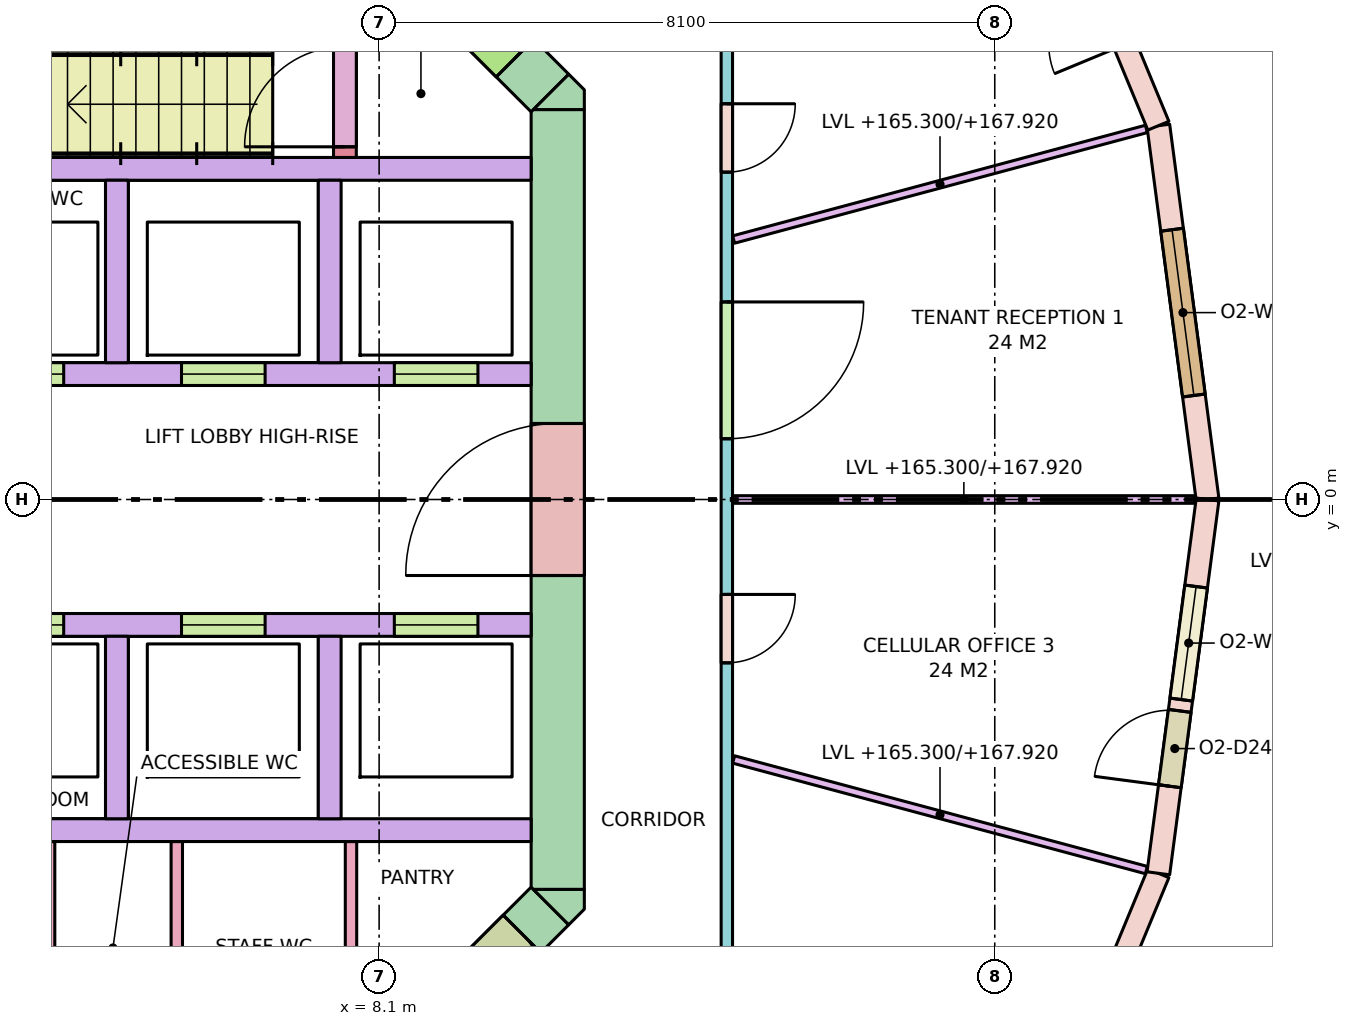
"""IFC4 building model, lengths in metres.
Left out: names, types, materials, properties, quantities, classifications, styles, units other than length and angle.
Written with IfcOpenShell. Run it as: python <this file> out.ifc"""

import sys

from ifc_helpers import new_model, si_unit, direction, frame, frame_2d, origin, place, context, subcontext, project, spatial, polyline, rectangle, outline, extrude, element, fill, save


model = new_model("IFC4")
c1 = context("Model", 3, precision=1e-05, world=origin(), true_north=direction((0.0, 1.0)))
c2 = subcontext(c1, "Body", "Model", "MODEL_VIEW")
j1 = project(units=[si_unit("LENGTHUNIT", "METRE"), si_unit("PLANEANGLEUNIT", "RADIAN")], contexts=[c1])
p1 = place(None, origin())
s1 = spatial("IfcSite", under=j1, at=p1, CompositionType="ELEMENT")
p2 = place(p1, origin())
s2 = spatial("IfcBuilding", under=s1, at=p2, CompositionType="ELEMENT")
p3 = place(p2, frame((0.0, 0.0, 165.3)))
s3 = spatial("IfcBuildingStorey", under=s2, at=p3, CompositionType="ELEMENT", Elevation=165.3)
p4 = place(p3, frame((10.45, -5.13, -0.28), z_axis=(0.0, 0.0, 1.0), x_axis=(0.0, 1.0, 0.0)))
e1 = element("IfcWall", 1, at=p4, inside=s3, PredefinedType="SHEAR", context=c2, shape_type="SweptSolid", body=[
    extrude(rectangle(XDim=10.26, YDim=0.7, at=frame_2d((5.13, 0.0))), origin(), (0.0, 0.0, 1.0), 3.7),
])
p5 = place(p4, frame((4.13, 0.0, 0.28)))
e2 = element("IfcOpeningElement", 2, at=p5, cuts=e1, PredefinedType="OPENING", context=c2, shape_type="SweptSolid", body=[
    extrude(rectangle(XDim=2.0, YDim=2.1, at=frame_2d((1.0, 1.05))), frame((0.0, 0.36, 0.0), z_axis=(0.0, -1.0, 0.0), x_axis=(1.0, 0.0, 0.0)), (0.0, 0.0, 1.0), 0.72),
])
p6 = place(p3, frame((7.347, 8.347, -0.28), z_axis=(0.0, 0.0, 1.0), x_axis=(0.707106781187, -0.707106781187, 0.0)))
e3 = element("IfcWall", 3, at=p6, inside=s3, PredefinedType="SHEAR", context=c2, shape_type="SweptSolid", body=[
    extrude(rectangle(XDim=4.243, YDim=0.7, at=frame_2d((2.121, 0.0))), origin(), (0.0, 0.0, 1.0), 3.7),
])
p7 = place(p6, frame((2.393, 0.0, 0.28)))
e4 = element("IfcOpeningElement", 4, at=p7, cuts=e3, PredefinedType="OPENING", context=c2, shape_type="SweptSolid", body=[
    extrude(rectangle(XDim=1.2, YDim=2.1, at=frame_2d((0.6, 1.05))), frame((0.0, 0.36, 0.0), z_axis=(0.0, -1.0, 0.0), x_axis=(1.0, 0.0, 0.0)), (0.0, 0.0, 1.0), 0.72),
])
p8 = place(p3, frame((10.347, -5.347, -0.28), z_axis=(0.0, 0.0, 1.0), x_axis=(-0.707106781187, -0.707106781187, 0.0)))
e5 = element("IfcWall", 5, at=p8, inside=s3, PredefinedType="SHEAR", context=c2, shape_type="SweptSolid", body=[
    extrude(rectangle(XDim=4.243, YDim=0.7, at=frame_2d((2.121, 0.0))), origin(), (0.0, 0.0, 1.0), 3.7),
])
p9 = place(p8, frame((0.52, 0.0, 0.28)))
e6 = element("IfcOpeningElement", 6, at=p9, cuts=e5, PredefinedType="OPENING", context=c2, shape_type="SweptSolid", body=[
    extrude(rectangle(XDim=0.9, YDim=2.1, at=frame_2d((0.45, 1.05))), frame((0.0, 0.36, 0.0), z_axis=(0.0, -1.0, 0.0), x_axis=(1.0, 0.0, 0.0)), (0.0, 0.0, 1.0), 0.72),
])
p10 = place(p3, frame((0.0, 0.0, -0.28)))
e7 = element("IfcWall", 7, at=p10, inside=s3, PredefinedType="SHEAR", context=c2, shape_type="SweptSolid", body=[
    extrude(outline(polyline([(10.8, -5.39), (10.595, -5.595), (10.595, -5.595), (10.595, -5.595), (10.13, -5.13), (10.8, -5.13), (10.8, -5.13), (10.8, -5.39)])), origin(), (0.0, 0.0, 1.0), 3.7),
])
p11 = place(p3, frame((0.0, 0.0, -0.28)))
e8 = element("IfcWall", 8, at=p11, inside=s3, PredefinedType="SHEAR", context=c2, shape_type="SweptSolid", body=[
    extrude(outline(polyline([(10.8, 5.39), (10.8, 5.13), (10.8, 5.13), (10.13, 5.13), (10.595, 5.595), (10.595, 5.595), (10.595, 5.595), (10.8, 5.39)])), origin(), (0.0, 0.0, 1.0), 3.7),
])
for number, where, z_axis, x_axis in (
    (9, (2.0, 4.35, 0.0), (0.0, 0.0, 1.0), (1.0, 0.0, 0.0)),
    (10, (2.0, -4.35, 0.0), (0.0, 0.0, 1.0), (1.0, 0.0, 0.0)),
):
    element("IfcWall", number, at=place(p3, frame(where, z_axis=z_axis, x_axis=x_axis)), inside=s3, PredefinedType="SOLIDWALL", context=c2, shape_type="SweptSolid", body=[
        extrude(rectangle(XDim=8.1, YDim=0.3, at=frame_2d((4.05, 0.0))), origin(), (0.0, 0.0, 1.0), 3.42),
    ])
p12 = place(p3, frame((2.0, 1.65, 0.0), z_axis=(0.0, 0.0, 1.0), x_axis=(1.0, 0.0, 0.0)))
e11 = element("IfcWall", 11, at=p12, inside=s3, PredefinedType="SOLIDWALL", context=c2, shape_type="SweptSolid", body=[
    extrude(rectangle(XDim=8.1, YDim=0.3, at=frame_2d((4.05, 0.0))), origin(), (0.0, 0.0, 1.0), 3.42),
])
p13 = place(p12, frame((0.85, 0.0, 0.0)))
e12 = element("IfcOpeningElement", 12, at=p13, cuts=e11, PredefinedType="OPENING", context=c2, shape_type="SweptSolid", body=[
    extrude(rectangle(XDim=1.1, YDim=2.1, at=frame_2d((0.55, 1.05))), frame((0.0, 0.16, 0.0), z_axis=(0.0, -1.0, 0.0), x_axis=(1.0, 0.0, 0.0)), (0.0, 0.0, 1.0), 0.32),
])
p14 = place(p12, frame((3.5, 0.0, 0.0)))
e13 = element("IfcOpeningElement", 13, at=p14, cuts=e11, PredefinedType="OPENING", context=c2, shape_type="SweptSolid", body=[
    extrude(rectangle(XDim=1.1, YDim=2.1, at=frame_2d((0.55, 1.05))), frame((0.0, 0.16, 0.0), z_axis=(0.0, -1.0, 0.0), x_axis=(1.0, 0.0, 0.0)), (0.0, 0.0, 1.0), 0.32),
])
p15 = place(p12, frame((6.3, 0.0, 0.0)))
e14 = element("IfcOpeningElement", 14, at=p15, cuts=e11, PredefinedType="OPENING", context=c2, shape_type="SweptSolid", body=[
    extrude(rectangle(XDim=1.1, YDim=2.1, at=frame_2d((0.55, 1.05))), frame((0.0, 0.16, 0.0), z_axis=(0.0, -1.0, 0.0), x_axis=(1.0, 0.0, 0.0)), (0.0, 0.0, 1.0), 0.32),
])
p16 = place(p3, frame((2.0, -1.65, 0.0), z_axis=(0.0, 0.0, 1.0), x_axis=(1.0, 0.0, 0.0)))
e15 = element("IfcWall", 15, at=p16, inside=s3, PredefinedType="SOLIDWALL", context=c2, shape_type="SweptSolid", body=[
    extrude(rectangle(XDim=8.1, YDim=0.3, at=frame_2d((4.05, 0.0))), origin(), (0.0, 0.0, 1.0), 3.42),
])
p17 = place(p16, frame((0.85, 0.0, 0.0)))
e16 = element("IfcOpeningElement", 16, at=p17, cuts=e15, PredefinedType="OPENING", context=c2, shape_type="SweptSolid", body=[
    extrude(rectangle(XDim=1.1, YDim=2.1, at=frame_2d((0.55, 1.05))), frame((0.0, 0.16, 0.0), z_axis=(0.0, -1.0, 0.0), x_axis=(1.0, 0.0, 0.0)), (0.0, 0.0, 1.0), 0.32),
])
p18 = place(p16, frame((3.5, 0.0, 0.0)))
e17 = element("IfcOpeningElement", 17, at=p18, cuts=e15, PredefinedType="OPENING", context=c2, shape_type="SweptSolid", body=[
    extrude(rectangle(XDim=1.1, YDim=2.1, at=frame_2d((0.55, 1.05))), frame((0.0, 0.16, 0.0), z_axis=(0.0, -1.0, 0.0), x_axis=(1.0, 0.0, 0.0)), (0.0, 0.0, 1.0), 0.32),
])
p19 = place(p16, frame((6.3, 0.0, 0.0)))
e18 = element("IfcOpeningElement", 18, at=p19, cuts=e15, PredefinedType="OPENING", context=c2, shape_type="SweptSolid", body=[
    extrude(rectangle(XDim=1.1, YDim=2.1, at=frame_2d((0.55, 1.05))), frame((0.0, 0.16, 0.0), z_axis=(0.0, -1.0, 0.0), x_axis=(1.0, 0.0, 0.0)), (0.0, 0.0, 1.0), 0.32),
])
for number, where, z_axis, x_axis in (
    (19, (4.65, 1.8, 0.0), (0.0, 0.0, 1.0), (0.0, 1.0, 0.0)),
    (20, (4.65, -4.2, 0.0), (0.0, 0.0, 1.0), (0.0, 1.0, 0.0)),
    (21, (7.45, 1.8, 0.0), (0.0, 0.0, 1.0), (0.0, 1.0, 0.0)),
    (22, (7.45, -4.2, 0.0), (0.0, 0.0, 1.0), (0.0, 1.0, 0.0)),
):
    element("IfcWall", number, at=place(p3, frame(where, z_axis=z_axis, x_axis=x_axis)), inside=s3, PredefinedType="SOLIDWALL", context=c2, shape_type="SweptSolid", body=[
        extrude(rectangle(XDim=2.4, YDim=0.3, at=frame_2d((1.2, 0.0))), origin(), (0.0, 0.0, 1.0), 3.42),
    ])
p20 = place(p3, frame((7.65, 4.5, 0.0), z_axis=(0.0, 0.0, 1.0), x_axis=(0.0, 1.0, 0.0)))
e23 = element("IfcWall", 23, at=p20, inside=s3, PredefinedType="SHEAR", context=c2, shape_type="SweptSolid", body=[
    extrude(rectangle(XDim=3.14, YDim=0.3, at=frame_2d((1.57, 0.0))), origin(), (0.0, 0.0, 1.0), 3.42),
])
p21 = place(p20, frame((0.14, 0.0, 0.0)))
e24 = element("IfcOpeningElement", 24, at=p21, cuts=e23, PredefinedType="OPENING", context=c2, shape_type="SweptSolid", body=[
    extrude(rectangle(XDim=1.32, YDim=2.1, at=frame_2d((0.66, 1.05))), frame((0.0, 0.16, 0.0), z_axis=(0.0, -1.0, 0.0), x_axis=(1.0, 0.0, 0.0)), (0.0, 0.0, 1.0), 0.32),
])
p22 = place(p3, frame((19.0, 0.0, 0.0), z_axis=(0.0, 0.0, 1.0), x_axis=(-0.130538549191, 0.991443234469, 0.0)))
e25 = element("IfcWall", 25, at=p22, inside=s3, PredefinedType="STANDARD", context=c2, shape_type="SweptSolid", body=[
    extrude(rectangle(XDim=4.96, YDim=0.3, at=frame_2d((2.48, 0.0))), origin(), (0.0, 0.0, 1.0), 3.42),
])
p23 = place(p22, frame((1.38, 0.0, 0.8)))
e26 = element("IfcOpeningElement", 26, at=p23, cuts=e25, PredefinedType="OPENING", context=c2, shape_type="SweptSolid", body=[
    extrude(rectangle(XDim=2.2, YDim=2.4, at=frame_2d((1.1, 1.2))), frame((0.0, 0.16, 0.0), z_axis=(0.0, -1.0, 0.0), x_axis=(1.0, 0.0, 0.0)), (0.0, 0.0, 1.0), 0.32),
])
p24 = place(p3, frame((18.353, 4.917, 0.0), z_axis=(0.0, 0.0, 1.0), x_axis=(-0.382650301762, 0.923893254961, 0.0)))
e27 = element("IfcWall", 27, at=p24, inside=s3, PredefinedType="STANDARD", context=c2, shape_type="SweptSolid", body=[
    extrude(rectangle(XDim=4.96, YDim=0.3, at=frame_2d((2.48, 0.0))), origin(), (0.0, 0.0, 1.0), 3.42),
])
p25 = place(p24, frame((1.155, 0.0, 0.0)))
e28 = element("IfcOpeningElement", 28, at=p25, cuts=e27, PredefinedType="OPENING", context=c2, shape_type="SweptSolid", body=[
    extrude(rectangle(XDim=1.0, YDim=2.4, at=frame_2d((0.5, 1.2))), frame((0.0, 0.16, 0.0), z_axis=(0.0, -1.0, 0.0), x_axis=(1.0, 0.0, 0.0)), (0.0, 0.0, 1.0), 0.32),
])
p26 = place(p24, frame((2.305, 0.0, 0.8)))
e29 = element("IfcOpeningElement", 29, at=p26, cuts=e27, PredefinedType="OPENING", context=c2, shape_type="SweptSolid", body=[
    extrude(rectangle(XDim=1.5, YDim=2.4, at=frame_2d((0.75, 1.2))), frame((0.0, 0.16, 0.0), z_axis=(0.0, -1.0, 0.0), x_axis=(1.0, 0.0, 0.0)), (0.0, 0.0, 1.0), 0.32),
])
p27 = place(p3, frame((16.455, -9.5, 0.0), z_axis=(0.0, 0.0, 1.0), x_axis=(0.382650301762, 0.923893254961, 0.0)))
e30 = element("IfcWall", 30, at=p27, inside=s3, PredefinedType="STANDARD", context=c2, shape_type="SweptSolid", body=[
    extrude(rectangle(XDim=4.96, YDim=0.3, at=frame_2d((2.48, 0.0))), origin(), (0.0, 0.0, 1.0), 3.42),
])
p28 = place(p27, frame((1.38, 0.0, 0.8)))
e31 = element("IfcOpeningElement", 31, at=p28, cuts=e30, PredefinedType="OPENING", context=c2, shape_type="SweptSolid", body=[
    extrude(rectangle(XDim=2.2, YDim=2.4, at=frame_2d((1.1, 1.2))), frame((0.0, 0.16, 0.0), z_axis=(0.0, -1.0, 0.0), x_axis=(1.0, 0.0, 0.0)), (0.0, 0.0, 1.0), 0.32),
])
p29 = place(p3, frame((18.353, -4.917, 0.0), z_axis=(0.0, 0.0, 1.0), x_axis=(0.130538549191, 0.991443234469, 0.0)))
e32 = element("IfcWall", 32, at=p29, inside=s3, PredefinedType="STANDARD", context=c2, shape_type="SweptSolid", body=[
    extrude(rectangle(XDim=4.96, YDim=0.3, at=frame_2d((2.48, 0.0))), origin(), (0.0, 0.0, 1.0), 3.42),
])
p30 = place(p29, frame((1.155, 0.0, 0.0)))
e33 = element("IfcOpeningElement", 33, at=p30, cuts=e32, PredefinedType="OPENING", context=c2, shape_type="SweptSolid", body=[
    extrude(rectangle(XDim=1.0, YDim=2.4, at=frame_2d((0.5, 1.2))), frame((0.0, 0.16, 0.0), z_axis=(0.0, -1.0, 0.0), x_axis=(1.0, 0.0, 0.0)), (0.0, 0.0, 1.0), 0.32),
])
p31 = place(p29, frame((2.305, 0.0, 0.8)))
e34 = element("IfcOpeningElement", 34, at=p31, cuts=e32, PredefinedType="OPENING", context=c2, shape_type="SweptSolid", body=[
    extrude(rectangle(XDim=1.5, YDim=2.4, at=frame_2d((0.75, 1.2))), frame((0.0, 0.16, 0.0), z_axis=(0.0, -1.0, 0.0), x_axis=(1.0, 0.0, 0.0)), (0.0, 0.0, 1.0), 0.32),
])
for number, where, z_axis, x_axis in (
    (35, (3.758, -8.1, 0.0), (0.0, 0.0, 1.0), (0.0, 1.0, 0.0)),
    (36, (5.438, -8.1, 0.0), (0.0, 0.0, 1.0), (0.0, 1.0, 0.0)),
):
    element("IfcWall", number, at=place(p3, frame(where, z_axis=z_axis, x_axis=x_axis)), inside=s3, PredefinedType="PARTITIONING", context=c2, shape_type="SweptSolid", body=[
        extrude(rectangle(XDim=3.6, YDim=0.15, at=frame_2d((1.8, 0.0))), origin(), (0.0, 0.0, 1.0), 3.42),
    ])
p32 = place(p3, frame((7.73, -7.395, 0.0), z_axis=(0.0, 0.0, 1.0), x_axis=(0.0, 1.0, 0.0)))
e37 = element("IfcWall", 37, at=p32, inside=s3, PredefinedType="PARTITIONING", context=c2, shape_type="SweptSolid", body=[
    extrude(rectangle(XDim=2.895, YDim=0.15, at=frame_2d((1.448, 0.0))), origin(), (0.0, 0.0, 1.0), 3.42),
])
p33 = place(p3, frame((12.675, 6.167, 0.0), z_axis=(0.0, 0.0, 1.0), x_axis=(0.0, -1.0, 0.0)))
e38 = element("IfcWall", 38, at=p33, inside=s3, PredefinedType="PARTITIONING", context=c2, shape_type="SweptSolid", body=[
    extrude(rectangle(XDim=12.333, YDim=0.15, at=frame_2d((6.167, 0.0))), origin(), (0.0, 0.0, 1.0), 2.62),
])
p34 = place(p33, frame((7.416, 0.0, 0.0)))
e39 = element("IfcOpeningElement", 39, at=p34, cuts=e38, PredefinedType="OPENING", context=c2, shape_type="SweptSolid", body=[
    extrude(rectangle(XDim=0.9, YDim=2.1, at=frame_2d((0.45, 1.05))), frame((0.0, 0.085, 0.0), z_axis=(0.0, -1.0, 0.0), x_axis=(1.0, 0.0, 0.0)), (0.0, 0.0, 1.0), 0.17),
])
p35 = place(p33, frame((3.568, 0.0, 0.0)))
e40 = element("IfcOpeningElement", 40, at=p35, cuts=e38, PredefinedType="OPENING", context=c2, shape_type="SweptSolid", body=[
    extrude(rectangle(XDim=1.8, YDim=2.1, at=frame_2d((0.9, 1.05))), frame((0.0, 0.085, 0.0), z_axis=(0.0, -1.0, 0.0), x_axis=(1.0, 0.0, 0.0)), (0.0, 0.0, 1.0), 0.17),
])
p36 = place(p33, frame((0.96, 0.0, 0.0)))
e41 = element("IfcOpeningElement", 41, at=p36, cuts=e38, PredefinedType="OPENING", context=c2, shape_type="SweptSolid", body=[
    extrude(rectangle(XDim=0.9, YDim=2.1, at=frame_2d((0.45, 1.05))), frame((0.0, 0.085, 0.0), z_axis=(0.0, -1.0, 0.0), x_axis=(1.0, 0.0, 0.0)), (0.0, 0.0, 1.0), 0.17),
])
p37 = place(p3, frame((12.75, 0.0, 0.0), z_axis=(0.0, 0.0, 1.0), x_axis=(1.0, 0.0, 0.0)))
e42 = element("IfcWall", 42, at=p37, inside=s3, PredefinedType="PARTITIONING", context=c2, shape_type="SweptSolid", body=[
    extrude(rectangle(XDim=6.087, YDim=0.1, at=frame_2d((3.043, 0.0))), origin(), (0.0, 0.0, 1.0), 2.62),
])
for number, where, z_axis, x_axis in (
    (43, (12.764, 3.42, 0.0), (0.0, 0.0, 1.0), (0.966, 0.259, 0.0)),
    (44, (12.764, -3.42, 0.0), (0.0, 0.0, 1.0), (0.966, -0.259, 0.0)),
):
    element("IfcWall", number, at=place(p3, frame(where, z_axis=z_axis, x_axis=x_axis)), inside=s3, PredefinedType="PARTITIONING", context=c2, shape_type="SweptSolid", body=[
        extrude(rectangle(XDim=5.622, YDim=0.1, at=frame_2d((2.811, 0.0))), origin(), (0.0, 0.0, 1.0), 2.62),
    ])
p38 = place(p23, origin())
e45 = element("IfcWindow", 45, at=p38, inside=s3, PartitioningType="SINGLE_PANEL", PredefinedType="WINDOW", context=c2, shape_type="SweptSolid", body=[
    extrude(rectangle(XDim=2.2, YDim=2.4, at=frame_2d((1.1, 1.2))), frame((0.0, 0.03, 0.0), z_axis=(0.0, -1.0, 0.0), x_axis=(1.0, 0.0, 0.0)), (0.0, 0.0, 1.0), 0.06),
])
fill(e26, e45)
p39 = place(p30, origin())
e46 = element("IfcDoor", 46, at=p39, inside=s3, OperationType="SINGLE_SWING_LEFT", PredefinedType="DOOR", context=c2, shape_type="SweptSolid", body=[
    extrude(rectangle(XDim=1.0, YDim=2.4, at=frame_2d((0.5, 1.2))), frame((0.0, 0.025, 0.0), z_axis=(0.0, -1.0, 0.0), x_axis=(1.0, 0.0, 0.0)), (0.0, 0.0, 1.0), 0.05),
])
fill(e33, e46)
p40 = place(p31, origin())
e47 = element("IfcWindow", 47, at=p40, inside=s3, PartitioningType="SINGLE_PANEL", PredefinedType="WINDOW", context=c2, shape_type="SweptSolid", body=[
    extrude(rectangle(XDim=1.5, YDim=2.4, at=frame_2d((0.75, 1.2))), frame((0.0, 0.03, 0.0), z_axis=(0.0, -1.0, 0.0), x_axis=(1.0, 0.0, 0.0)), (0.0, 0.0, 1.0), 0.06),
])
fill(e34, e47)
p41 = place(p13, origin())
e48 = element("IfcDoor", 48, at=p41, inside=s3, OperationType="DOUBLE_DOOR_SLIDING", PredefinedType="DOOR", context=c2, shape_type="SweptSolid", body=[
    extrude(rectangle(XDim=1.1, YDim=2.1, at=frame_2d((0.55, 1.05))), frame((0.0, 0.025, 0.0), z_axis=(0.0, -1.0, 0.0), x_axis=(1.0, 0.0, 0.0)), (0.0, 0.0, 1.0), 0.05),
])
fill(e12, e48)
p42 = place(p14, origin())
e49 = element("IfcDoor", 49, at=p42, inside=s3, OperationType="DOUBLE_DOOR_SLIDING", PredefinedType="DOOR", context=c2, shape_type="SweptSolid", body=[
    extrude(rectangle(XDim=1.1, YDim=2.1, at=frame_2d((0.55, 1.05))), frame((0.0, 0.025, 0.0), z_axis=(0.0, -1.0, 0.0), x_axis=(1.0, 0.0, 0.0)), (0.0, 0.0, 1.0), 0.05),
])
fill(e13, e49)
p43 = place(p15, origin())
e50 = element("IfcDoor", 50, at=p43, inside=s3, OperationType="DOUBLE_DOOR_SLIDING", PredefinedType="DOOR", context=c2, shape_type="SweptSolid", body=[
    extrude(rectangle(XDim=1.1, YDim=2.1, at=frame_2d((0.55, 1.05))), frame((0.0, 0.025, 0.0), z_axis=(0.0, -1.0, 0.0), x_axis=(1.0, 0.0, 0.0)), (0.0, 0.0, 1.0), 0.05),
])
fill(e14, e50)
p44 = place(p17, origin())
e51 = element("IfcDoor", 51, at=p44, inside=s3, OperationType="DOUBLE_DOOR_SLIDING", PredefinedType="DOOR", context=c2, shape_type="SweptSolid", body=[
    extrude(rectangle(XDim=1.1, YDim=2.1, at=frame_2d((0.55, 1.05))), frame((0.0, 0.025, 0.0), z_axis=(0.0, -1.0, 0.0), x_axis=(1.0, 0.0, 0.0)), (0.0, 0.0, 1.0), 0.05),
])
fill(e16, e51)
p45 = place(p18, origin())
e52 = element("IfcDoor", 52, at=p45, inside=s3, OperationType="DOUBLE_DOOR_SLIDING", PredefinedType="DOOR", context=c2, shape_type="SweptSolid", body=[
    extrude(rectangle(XDim=1.1, YDim=2.1, at=frame_2d((0.55, 1.05))), frame((0.0, 0.025, 0.0), z_axis=(0.0, -1.0, 0.0), x_axis=(1.0, 0.0, 0.0)), (0.0, 0.0, 1.0), 0.05),
])
fill(e17, e52)
p46 = place(p19, origin())
e53 = element("IfcDoor", 53, at=p46, inside=s3, OperationType="DOUBLE_DOOR_SLIDING", PredefinedType="DOOR", context=c2, shape_type="SweptSolid", body=[
    extrude(rectangle(XDim=1.1, YDim=2.1, at=frame_2d((0.55, 1.05))), frame((0.0, 0.025, 0.0), z_axis=(0.0, -1.0, 0.0), x_axis=(1.0, 0.0, 0.0)), (0.0, 0.0, 1.0), 0.05),
])
fill(e18, e53)
p47 = place(p21, origin())
e54 = element("IfcDoor", 54, at=p47, inside=s3, OperationType="DOUBLE_DOOR_SINGLE_SWING", PredefinedType="DOOR", context=c2, shape_type="SweptSolid", body=[
    extrude(rectangle(XDim=1.32, YDim=2.1, at=frame_2d((0.66, 1.05))), frame((0.0, 0.025, 0.0), z_axis=(0.0, -1.0, 0.0), x_axis=(1.0, 0.0, 0.0)), (0.0, 0.0, 1.0), 0.05),
])
fill(e24, e54)
p48 = place(p7, origin())
e55 = element("IfcDoor", 55, at=p48, inside=s3, OperationType="SINGLE_SWING_RIGHT", PredefinedType="DOOR", context=c2, shape_type="SweptSolid", body=[
    extrude(rectangle(XDim=1.2, YDim=2.1, at=frame_2d((0.6, 1.05))), frame((0.0, 0.025, 0.0), z_axis=(0.0, -1.0, 0.0), x_axis=(1.0, 0.0, 0.0)), (0.0, 0.0, 1.0), 0.05),
])
fill(e4, e55)
p49 = place(p5, origin())
e56 = element("IfcDoor", 56, at=p49, inside=s3, OperationType="DOUBLE_DOOR_SINGLE_SWING", PredefinedType="DOOR", context=c2, shape_type="SweptSolid", body=[
    extrude(rectangle(XDim=2.0, YDim=2.1, at=frame_2d((1.0, 1.05))), frame((0.0, 0.025, 0.0), z_axis=(0.0, -1.0, 0.0), x_axis=(1.0, 0.0, 0.0)), (0.0, 0.0, 1.0), 0.05),
])
fill(e2, e56)
p50 = place(p9, origin())
e57 = element("IfcDoor", 57, at=p50, inside=s3, OperationType="SINGLE_SWING_RIGHT", PredefinedType="DOOR", context=c2, shape_type="SweptSolid", body=[
    extrude(rectangle(XDim=0.9, YDim=2.1, at=frame_2d((0.45, 1.05))), frame((0.0, 0.025, 0.0), z_axis=(0.0, -1.0, 0.0), x_axis=(1.0, 0.0, 0.0)), (0.0, 0.0, 1.0), 0.05),
])
fill(e6, e57)
p51 = place(p34, origin())
e58 = element("IfcDoor", 58, at=p51, inside=s3, OperationType="SINGLE_SWING_LEFT", PredefinedType="DOOR", context=c2, shape_type="SweptSolid", body=[
    extrude(rectangle(XDim=0.9, YDim=2.1, at=frame_2d((0.45, 1.05))), frame((0.0, 0.025, 0.0), z_axis=(0.0, -1.0, 0.0), x_axis=(1.0, 0.0, 0.0)), (0.0, 0.0, 1.0), 0.05),
])
fill(e39, e58)
p52 = place(p35, origin())
e59 = element("IfcDoor", 59, at=p52, inside=s3, OperationType="DOUBLE_DOOR_SINGLE_SWING", PredefinedType="DOOR", context=c2, shape_type="SweptSolid", body=[
    extrude(rectangle(XDim=1.8, YDim=2.1, at=frame_2d((0.9, 1.05))), frame((0.0, 0.025, 0.0), z_axis=(0.0, -1.0, 0.0), x_axis=(1.0, 0.0, 0.0)), (0.0, 0.0, 1.0), 0.05),
])
fill(e40, e59)
p53 = place(p36, origin())
e60 = element("IfcDoor", 60, at=p53, inside=s3, OperationType="SINGLE_SWING_LEFT", PredefinedType="DOOR", context=c2, shape_type="SweptSolid", body=[
    extrude(rectangle(XDim=0.9, YDim=2.1, at=frame_2d((0.45, 1.05))), frame((0.0, 0.025, 0.0), z_axis=(0.0, -1.0, 0.0), x_axis=(1.0, 0.0, 0.0)), (0.0, 0.0, 1.0), 0.05),
])
fill(e41, e60)
save(model, sys.argv[1])
